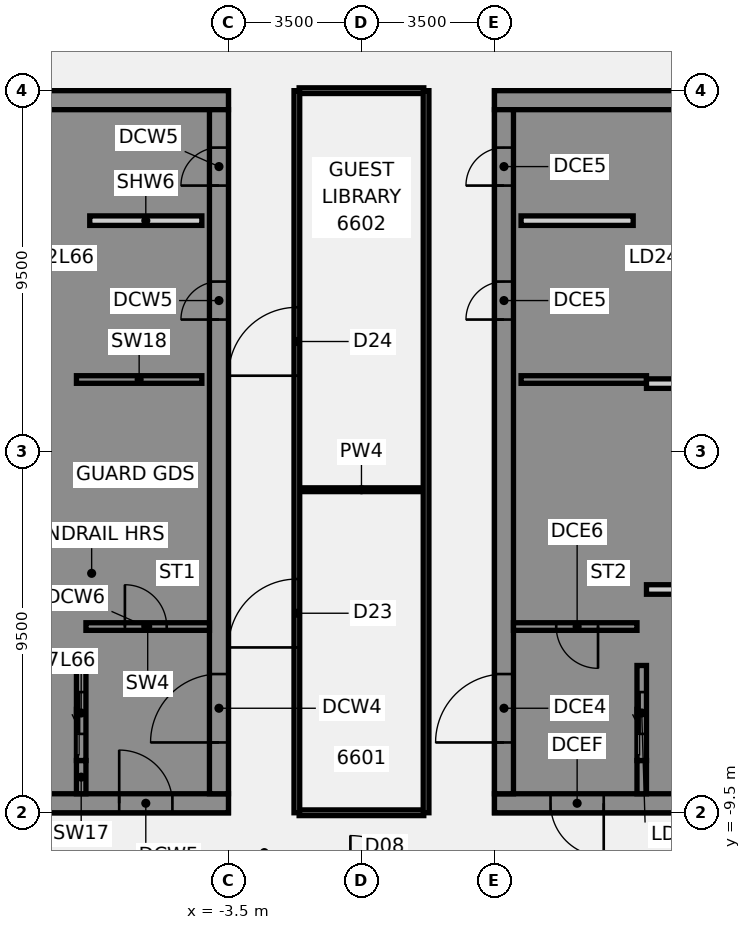
"""IFC4 building model, lengths in metres.
Left out: names, types, materials, properties, quantities, classifications, styles, units other than length and angle.
Written with IfcOpenShell. Run it as: python <this file> out.ifc"""

import sys

from ifc_helpers import new_model, si_unit, direction, frame, frame_2d, origin, place, context, subcontext, project, spatial, polyline, rectangle, outline, extrude, element, fill, save


model = new_model("IFC4")
c1 = context("Model", 3, precision=1e-05, world=origin(), true_north=direction((0.0, 1.0)))
c2 = subcontext(c1, "Body", "Model", "MODEL_VIEW")
j1 = project(units=[si_unit("LENGTHUNIT", "METRE"), si_unit("PLANEANGLEUNIT", "RADIAN")], contexts=[c1])
p1 = place(None, origin())
s1 = spatial("IfcSite", under=j1, at=p1, CompositionType="ELEMENT")
p2 = place(p1, origin())
s2 = spatial("IfcBuilding", under=s1, at=p2, CompositionType="ELEMENT")
p3 = place(p2, frame((0.0, 0.0, 260.4)))
s3 = spatial("IfcBuildingStorey", under=s2, at=p3, CompositionType="ELEMENT", Elevation=260.4)
p4 = place(p3, frame((-1.64, -9.5, 0.0), z_axis=(0.0, 0.0, 1.0), x_axis=(1.0, 0.0, 0.0)))
e1 = element("IfcWall", 1, at=p4, inside=s3, PredefinedType="PARTITIONING", context=c2, shape_type="SweptSolid", body=[
    extrude(rectangle(XDim=3.28, YDim=0.15, at=frame_2d((1.64, 0.0))), origin(), (0.0, 0.0, 1.0), 2.864),
])
p5 = place(p3, frame((-1.64, -1.0, 0.0), z_axis=(0.0, 0.0, 1.0), x_axis=(1.0, 0.0, 0.0)))
e2 = element("IfcWall", 2, at=p5, inside=s3, PredefinedType="PARTITIONING", context=c2, shape_type="SweptSolid", body=[
    extrude(rectangle(XDim=3.28, YDim=0.1, at=frame_2d((1.64, 0.0))), origin(), (0.0, 0.0, 1.0), 2.864),
])
p6 = place(p3, frame((-1.64, 9.5, 0.0), z_axis=(0.0, 0.0, 1.0), x_axis=(1.0, 0.0, 0.0)))
e3 = element("IfcWall", 3, at=p6, inside=s3, PredefinedType="PARTITIONING", context=c2, shape_type="SweptSolid", body=[
    extrude(rectangle(XDim=3.28, YDim=0.15, at=frame_2d((1.64, 0.0))), origin(), (0.0, 0.0, 1.0), 2.864),
])
p7 = place(p3, frame((-1.7, -9.5, 0.0), z_axis=(0.0, 0.0, 1.0), x_axis=(0.0, 1.0, 0.0)))
e4 = element("IfcWall", 4, at=p7, inside=s3, PredefinedType="PARTITIONING", context=c2, shape_type="SweptSolid", body=[
    extrude(rectangle(XDim=19.0, YDim=0.15, at=frame_2d((9.5, 0.0))), origin(), (0.0, 0.0, 1.0), 2.864),
])
p8 = place(p7, frame((4.35, 0.0, 0.0)))
e5 = element("IfcOpeningElement", 5, at=p8, cuts=e4, PredefinedType="OPENING", context=c2, shape_type="SweptSolid", body=[
    extrude(rectangle(XDim=1.8, YDim=2.1, at=frame_2d((0.9, 1.05))), frame((0.0, 0.085, 0.0), z_axis=(0.0, -1.0, 0.0), x_axis=(1.0, 0.0, 0.0)), (0.0, 0.0, 1.0), 0.17),
])
p9 = place(p7, frame((11.5, 0.0, 0.0)))
e6 = element("IfcOpeningElement", 6, at=p9, cuts=e4, PredefinedType="OPENING", context=c2, shape_type="SweptSolid", body=[
    extrude(rectangle(XDim=1.8, YDim=2.1, at=frame_2d((0.9, 1.05))), frame((0.0, 0.085, 0.0), z_axis=(0.0, -1.0, 0.0), x_axis=(1.0, 0.0, 0.0)), (0.0, 0.0, 1.0), 0.17),
])
p10 = place(p3, frame((1.7, -9.5, 0.0), z_axis=(0.0, 0.0, 1.0), x_axis=(0.0, 1.0, 0.0)))
e7 = element("IfcWall", 7, at=p10, inside=s3, PredefinedType="PARTITIONING", context=c2, shape_type="SweptSolid", body=[
    extrude(rectangle(XDim=19.0, YDim=0.15, at=frame_2d((9.5, 0.0))), origin(), (0.0, 0.0, 1.0), 2.864),
])
p11 = place(p3, frame((-16.5, -9.25, 0.0), z_axis=(0.0, 0.0, 1.0), x_axis=(1.0, 0.0, 0.0)))
e8 = element("IfcWall", 8, at=p11, inside=s3, PredefinedType="SHEAR", context=c2, shape_type="SweptSolid", body=[
    extrude(rectangle(XDim=13.0, YDim=0.5, at=frame_2d((6.5, 0.0))), origin(), (0.0, 0.0, 1.0), 3.46),
])
p12 = place(p11, frame((4.15, 0.0, 0.0)))
e9 = element("IfcOpeningElement", 9, at=p12, cuts=e8, PredefinedType="OPENING", context=c2, shape_type="SweptSolid", body=[
    extrude(rectangle(XDim=1.4, YDim=2.1, at=frame_2d((0.7, 1.05))), frame((0.0, 0.26, 0.0), z_axis=(0.0, -1.0, 0.0), x_axis=(1.0, 0.0, 0.0)), (0.0, 0.0, 1.0), 0.52),
])
p13 = place(p11, frame((10.125, 0.0, 0.0)))
e10 = element("IfcOpeningElement", 10, at=p13, cuts=e8, PredefinedType="OPENING", context=c2, shape_type="SweptSolid", body=[
    extrude(rectangle(XDim=1.4, YDim=2.1, at=frame_2d((0.7, 1.05))), frame((0.0, 0.26, 0.0), z_axis=(0.0, -1.0, 0.0), x_axis=(1.0, 0.0, 0.0)), (0.0, 0.0, 1.0), 0.52),
])
p14 = place(p3, frame((-16.5, 9.25, 0.0), z_axis=(0.0, 0.0, 1.0), x_axis=(1.0, 0.0, 0.0)))
e11 = element("IfcWall", 11, at=p14, inside=s3, PredefinedType="SHEAR", context=c2, shape_type="SweptSolid", body=[
    extrude(rectangle(XDim=13.0, YDim=0.5, at=frame_2d((6.5, 0.0))), origin(), (0.0, 0.0, 1.0), 3.46),
])
p15 = place(p3, origin())
e12 = element("IfcWall", 12, at=p15, inside=s3, PredefinedType="SHEAR", context=c2, shape_type="SweptSolid", body=[
    extrude(outline(polyline([(-9.8, -5.375), (-9.8, -5.625), (-7.5, -5.625), (-7.25, -5.625), (-7.25, 9.0), (-7.5, 9.0), (-9.8, 9.0), (-9.8, 8.125), (-7.5, 8.125), (-7.5, 5.625), (-9.8, 5.625), (-9.8, 5.375), (-7.5, 5.375), (-7.5, 2.875), (-9.8, 2.875), (-9.8, 2.625), (-7.5, 2.625), (-7.5, -5.375), (-9.8, -5.375)])), origin(), (0.0, 0.0, 1.0), 3.46),
])
p16 = place(p3, origin())
e13 = element("IfcWall", 13, at=p16, inside=s3, PredefinedType="SHEAR", context=c2, shape_type="SweptSolid", body=[
    extrude(outline(polyline([(-7.5, -8.125), (-9.55, -8.125), (-9.55, -5.625), (-9.8, -5.625), (-9.8, -8.125), (-9.8, -9.0), (-7.5, -9.0), (-7.5, -8.125)])), origin(), (0.0, 0.0, 1.0), 3.46),
])
p17 = place(p3, frame((-7.375, -9.0, 0.0), z_axis=(0.0, 0.0, 1.0), x_axis=(0.0, 1.0, 0.0)))
e14 = element("IfcWall", 14, at=p17, inside=s3, PredefinedType="SHEAR", context=c2, shape_type="SweptSolid", body=[
    extrude(rectangle(XDim=0.875, YDim=0.25, at=frame_2d((0.438, 0.0))), origin(), (0.0, 0.0, 1.0), 3.46),
])
p18 = place(p3, frame((-7.5, 1.9, 0.0), z_axis=(0.0, 0.0, 1.0), x_axis=(1.0, 0.0, 0.0)))
e15 = element("IfcWall", 15, at=p18, inside=s3, PredefinedType="SHEAR", context=c2, shape_type="SweptSolid", body=[
    extrude(rectangle(XDim=3.3, YDim=0.2, at=frame_2d((1.65, 0.0))), origin(), (0.0, 0.0, 1.0), 3.46),
])
p19 = place(p3, frame((-7.375, -8.125, 0.0), z_axis=(0.0, 0.0, 1.0), x_axis=(0.0, 1.0, 0.0)))
e16 = element("IfcWall", 16, at=p19, inside=s3, PredefinedType="SHEAR", context=c2, shape_type="SweptSolid", body=[
    extrude(rectangle(XDim=2.5, YDim=0.25, at=frame_2d((1.25, 0.0))), origin(), (0.0, 0.0, 1.0), 3.46),
])
p20 = place(p19, frame((0.7, 0.0, 0.0)))
e17 = element("IfcOpeningElement", 17, at=p20, cuts=e16, PredefinedType="OPENING", context=c2, shape_type="SweptSolid", body=[
    extrude(rectangle(XDim=1.1, YDim=2.1, at=frame_2d((0.55, 1.05))), frame((0.0, 0.135, 0.0), z_axis=(0.0, -1.0, 0.0), x_axis=(1.0, 0.0, 0.0)), (0.0, 0.0, 1.0), 0.27),
])
p21 = place(p3, frame((-3.75, -9.0, 0.0), z_axis=(0.0, 0.0, 1.0), x_axis=(0.0, 1.0, 0.0)))
e18 = element("IfcWall", 18, at=p21, inside=s3, PredefinedType="SHEAR", context=c2, shape_type="SweptSolid", body=[
    extrude(rectangle(XDim=18.0, YDim=0.5, at=frame_2d((9.0, 0.0))), origin(), (0.0, 0.0, 1.0), 3.46),
])
p22 = place(p21, frame((1.35, 0.0, 0.0)))
e19 = element("IfcOpeningElement", 19, at=p22, cuts=e18, PredefinedType="OPENING", context=c2, shape_type="SweptSolid", body=[
    extrude(rectangle(XDim=1.8, YDim=2.1, at=frame_2d((0.9, 1.05))), frame((0.0, 0.26, 0.0), z_axis=(0.0, -1.0, 0.0), x_axis=(1.0, 0.0, 0.0)), (0.0, 0.0, 1.0), 0.52),
])
p23 = place(p21, frame((12.478, 0.0, 0.0)))
e20 = element("IfcOpeningElement", 20, at=p23, cuts=e18, PredefinedType="OPENING", context=c2, shape_type="SweptSolid", body=[
    extrude(rectangle(XDim=1.0, YDim=2.1, at=frame_2d((0.5, 1.05))), frame((0.0, 0.26, 0.0), z_axis=(0.0, -1.0, 0.0), x_axis=(1.0, 0.0, 0.0)), (0.0, 0.0, 1.0), 0.52),
])
p24 = place(p21, frame((16.002, 0.0, 0.0)))
e21 = element("IfcOpeningElement", 21, at=p24, cuts=e18, PredefinedType="OPENING", context=c2, shape_type="SweptSolid", body=[
    extrude(rectangle(XDim=1.0, YDim=2.1, at=frame_2d((0.5, 1.05))), frame((0.0, 0.26, 0.0), z_axis=(0.0, -1.0, 0.0), x_axis=(1.0, 0.0, 0.0)), (0.0, 0.0, 1.0), 0.52),
])
p25 = place(p3, frame((-7.15, 6.08, 0.0), z_axis=(0.0, 0.0, 1.0), x_axis=(1.0, 0.0, 0.0)))
e22 = element("IfcWall", 22, at=p25, inside=s3, PredefinedType="PARTITIONING", context=c2, shape_type="SweptSolid", body=[
    extrude(rectangle(XDim=2.95, YDim=0.25, at=frame_2d((1.475, 0.0))), origin(), (0.0, 0.0, 1.0), 3.46),
])
p26 = place(p3, frame((-7.25, -4.6, 0.0), z_axis=(0.0, 0.0, 1.0), x_axis=(1.0, 0.0, 0.0)))
e23 = element("IfcWall", 23, at=p26, inside=s3, PredefinedType="SHEAR", context=c2, shape_type="SweptSolid", body=[
    extrude(rectangle(XDim=3.25, YDim=0.2, at=frame_2d((1.625, 0.0))), origin(), (0.0, 0.0, 1.0), 3.46),
])
p27 = place(p26, frame((1.025, 0.0, 0.0)))
e24 = element("IfcOpeningElement", 24, at=p27, cuts=e23, PredefinedType="OPENING", context=c2, shape_type="SweptSolid", body=[
    extrude(rectangle(XDim=1.1, YDim=2.1, at=frame_2d((0.55, 1.05))), frame((0.0, 0.11, 0.0), z_axis=(0.0, -1.0, 0.0), x_axis=(1.0, 0.0, 0.0)), (0.0, 0.0, 1.0), 0.22),
])
p28 = place(p3, frame((16.5, -9.25, 0.0), z_axis=(0.0, 0.0, 1.0), x_axis=(-1.0, 0.0, 0.0)))
e25 = element("IfcWall", 25, at=p28, inside=s3, PredefinedType="SHEAR", context=c2, shape_type="SweptSolid", body=[
    extrude(rectangle(XDim=13.0, YDim=0.5, at=frame_2d((6.5, 0.0))), origin(), (0.0, 0.0, 1.0), 3.46),
])
p29 = place(p28, frame((4.15, 0.0, 0.0)))
e26 = element("IfcOpeningElement", 26, at=p29, cuts=e25, PredefinedType="OPENING", context=c2, shape_type="SweptSolid", body=[
    extrude(rectangle(XDim=1.4, YDim=2.1, at=frame_2d((0.7, 1.05))), frame((0.0, 0.26, 0.0), z_axis=(0.0, -1.0, 0.0), x_axis=(1.0, 0.0, 0.0)), (0.0, 0.0, 1.0), 0.52),
])
p30 = place(p28, frame((10.125, 0.0, 0.0)))
e27 = element("IfcOpeningElement", 27, at=p30, cuts=e25, PredefinedType="OPENING", context=c2, shape_type="SweptSolid", body=[
    extrude(rectangle(XDim=1.4, YDim=2.1, at=frame_2d((0.7, 1.05))), frame((0.0, 0.26, 0.0), z_axis=(0.0, -1.0, 0.0), x_axis=(1.0, 0.0, 0.0)), (0.0, 0.0, 1.0), 0.52),
])
p31 = place(p3, frame((16.5, 9.25, 0.0), z_axis=(0.0, 0.0, 1.0), x_axis=(-1.0, 0.0, 0.0)))
e28 = element("IfcWall", 28, at=p31, inside=s3, PredefinedType="SHEAR", context=c2, shape_type="SweptSolid", body=[
    extrude(rectangle(XDim=13.0, YDim=0.5, at=frame_2d((6.5, 0.0))), origin(), (0.0, 0.0, 1.0), 3.46),
])
p32 = place(p3, origin())
e29 = element("IfcWall", 29, at=p32, inside=s3, PredefinedType="SHEAR", context=c2, shape_type="SweptSolid", body=[
    extrude(outline(polyline([(9.8, -5.375), (7.5, -5.375), (7.5, 2.625), (9.8, 2.625), (9.8, 2.875), (7.5, 2.875), (7.5, 5.375), (9.8, 5.375), (9.8, 5.625), (7.5, 5.625), (7.5, 8.125), (9.8, 8.125), (9.8, 9.0), (7.5, 9.0), (7.25, 9.0), (7.25, -5.625), (7.5, -5.625), (9.8, -5.625), (9.8, -5.375)])), origin(), (0.0, 0.0, 1.0), 3.46),
])
p33 = place(p3, origin())
e30 = element("IfcWall", 30, at=p33, inside=s3, PredefinedType="SHEAR", context=c2, shape_type="SweptSolid", body=[
    extrude(outline(polyline([(7.5, -8.125), (7.5, -9.0), (9.8, -9.0), (9.8, -8.125), (9.8, -5.625), (9.55, -5.625), (9.55, -8.125), (7.5, -8.125)])), origin(), (0.0, 0.0, 1.0), 3.46),
])
p34 = place(p3, frame((7.375, -9.0, 0.0), z_axis=(0.0, 0.0, 1.0), x_axis=(0.0, 1.0, 0.0)))
e31 = element("IfcWall", 31, at=p34, inside=s3, PredefinedType="SHEAR", context=c2, shape_type="SweptSolid", body=[
    extrude(rectangle(XDim=0.875, YDim=0.25, at=frame_2d((0.438, 0.0))), origin(), (0.0, 0.0, 1.0), 3.46),
])
p35 = place(p3, frame((7.5, 1.9, 0.0), z_axis=(0.0, 0.0, 1.0), x_axis=(-1.0, 0.0, 0.0)))
e32 = element("IfcWall", 32, at=p35, inside=s3, PredefinedType="SHEAR", context=c2, shape_type="SweptSolid", body=[
    extrude(rectangle(XDim=3.3, YDim=0.2, at=frame_2d((1.65, 0.0))), origin(), (0.0, 0.0, 1.0), 3.46),
])
p36 = place(p3, frame((7.375, -8.125, 0.0), z_axis=(0.0, 0.0, 1.0), x_axis=(0.0, 1.0, 0.0)))
e33 = element("IfcWall", 33, at=p36, inside=s3, PredefinedType="SHEAR", context=c2, shape_type="SweptSolid", body=[
    extrude(rectangle(XDim=2.5, YDim=0.25, at=frame_2d((1.25, 0.0))), origin(), (0.0, 0.0, 1.0), 3.46),
])
p37 = place(p36, frame((0.7, 0.0, 0.0)))
e34 = element("IfcOpeningElement", 34, at=p37, cuts=e33, PredefinedType="OPENING", context=c2, shape_type="SweptSolid", body=[
    extrude(rectangle(XDim=1.1, YDim=2.1, at=frame_2d((0.55, 1.05))), frame((0.0, 0.135, 0.0), z_axis=(0.0, -1.0, 0.0), x_axis=(1.0, 0.0, 0.0)), (0.0, 0.0, 1.0), 0.27),
])
p38 = place(p3, frame((3.75, -9.0, 0.0), z_axis=(0.0, 0.0, 1.0), x_axis=(0.0, 1.0, 0.0)))
e35 = element("IfcWall", 35, at=p38, inside=s3, PredefinedType="SHEAR", context=c2, shape_type="SweptSolid", body=[
    extrude(rectangle(XDim=18.0, YDim=0.5, at=frame_2d((9.0, 0.0))), origin(), (0.0, 0.0, 1.0), 3.46),
])
p39 = place(p38, frame((1.35, 0.0, 0.0)))
e36 = element("IfcOpeningElement", 36, at=p39, cuts=e35, PredefinedType="OPENING", context=c2, shape_type="SweptSolid", body=[
    extrude(rectangle(XDim=1.8, YDim=2.1, at=frame_2d((0.9, 1.05))), frame((0.0, 0.26, 0.0), z_axis=(0.0, -1.0, 0.0), x_axis=(1.0, 0.0, 0.0)), (0.0, 0.0, 1.0), 0.52),
])
p40 = place(p38, frame((12.478, 0.0, 0.0)))
e37 = element("IfcOpeningElement", 37, at=p40, cuts=e35, PredefinedType="OPENING", context=c2, shape_type="SweptSolid", body=[
    extrude(rectangle(XDim=1.0, YDim=2.1, at=frame_2d((0.5, 1.05))), frame((0.0, 0.26, 0.0), z_axis=(0.0, -1.0, 0.0), x_axis=(1.0, 0.0, 0.0)), (0.0, 0.0, 1.0), 0.52),
])
p41 = place(p38, frame((16.002, 0.0, 0.0)))
e38 = element("IfcOpeningElement", 38, at=p41, cuts=e35, PredefinedType="OPENING", context=c2, shape_type="SweptSolid", body=[
    extrude(rectangle(XDim=1.0, YDim=2.1, at=frame_2d((0.5, 1.05))), frame((0.0, 0.26, 0.0), z_axis=(0.0, -1.0, 0.0), x_axis=(1.0, 0.0, 0.0)), (0.0, 0.0, 1.0), 0.52),
])
p42 = place(p3, frame((7.15, 6.08, 0.0), z_axis=(0.0, 0.0, 1.0), x_axis=(-1.0, 0.0, 0.0)))
e39 = element("IfcWall", 39, at=p42, inside=s3, PredefinedType="PARTITIONING", context=c2, shape_type="SweptSolid", body=[
    extrude(rectangle(XDim=2.95, YDim=0.25, at=frame_2d((1.475, 0.0))), origin(), (0.0, 0.0, 1.0), 3.46),
])
p43 = place(p3, frame((7.25, -4.6, 0.0), z_axis=(0.0, 0.0, 1.0), x_axis=(-1.0, 0.0, 0.0)))
e40 = element("IfcWall", 40, at=p43, inside=s3, PredefinedType="SHEAR", context=c2, shape_type="SweptSolid", body=[
    extrude(rectangle(XDim=3.25, YDim=0.2, at=frame_2d((1.625, 0.0))), origin(), (0.0, 0.0, 1.0), 3.46),
])
p44 = place(p43, frame((1.025, 0.0, 0.0)))
e41 = element("IfcOpeningElement", 41, at=p44, cuts=e40, PredefinedType="OPENING", context=c2, shape_type="SweptSolid", body=[
    extrude(rectangle(XDim=1.1, YDim=2.1, at=frame_2d((0.55, 1.05))), frame((0.0, 0.11, 0.0), z_axis=(0.0, -1.0, 0.0), x_axis=(1.0, 0.0, 0.0)), (0.0, 0.0, 1.0), 0.22),
])
for number, where, z_axis, x_axis in (
    (42, (9.8, -3.625, 0.0), (0.0, 0.0, 1.0), (-1.0, 0.0, 0.0)),
    (43, (9.8, 1.792, 0.0), (0.0, 0.0, 1.0), (-1.0, 0.0, 0.0)),
):
    element("IfcWall", number, at=place(p3, frame(where, z_axis=z_axis, x_axis=x_axis)), inside=s3, PredefinedType="PARTITIONING", context=c2, shape_type="SweptSolid", body=[
        extrude(rectangle(XDim=2.3, YDim=0.25, at=frame_2d((1.15, 0.0))), origin(), (0.0, 0.0, 1.0), 3.46),
    ])
p45 = place(p8, frame((1.8, 0.0, 0.0), z_axis=(0.0, 0.0, 1.0), x_axis=(-1.0, 0.0, 0.0)))
e44 = element("IfcDoor", 44, at=p45, inside=s3, OperationType="DOUBLE_DOOR_SINGLE_SWING", PredefinedType="DOOR", context=c2, shape_type="SweptSolid", body=[
    extrude(rectangle(XDim=1.8, YDim=2.1, at=frame_2d((0.9, 1.05))), frame((0.0, 0.025, 0.0), z_axis=(0.0, -1.0, 0.0), x_axis=(1.0, 0.0, 0.0)), (0.0, 0.0, 1.0), 0.05),
])
fill(e5, e44)
p46 = place(p9, frame((1.8, 0.0, 0.0), z_axis=(0.0, 0.0, 1.0), x_axis=(-1.0, 0.0, 0.0)))
e45 = element("IfcDoor", 45, at=p46, inside=s3, OperationType="DOUBLE_DOOR_SINGLE_SWING", PredefinedType="DOOR", context=c2, shape_type="SweptSolid", body=[
    extrude(rectangle(XDim=1.8, YDim=2.1, at=frame_2d((0.9, 1.05))), frame((0.0, 0.025, 0.0), z_axis=(0.0, -1.0, 0.0), x_axis=(1.0, 0.0, 0.0)), (0.0, 0.0, 1.0), 0.05),
])
fill(e6, e45)
p47 = place(p13, origin())
e46 = element("IfcDoor", 46, at=p47, inside=s3, OperationType="SINGLE_SWING_LEFT", PredefinedType="DOOR", context=c2, shape_type="SweptSolid", body=[
    extrude(rectangle(XDim=1.4, YDim=2.1, at=frame_2d((0.7, 1.05))), frame((0.0, 0.025, 0.0), z_axis=(0.0, -1.0, 0.0), x_axis=(1.0, 0.0, 0.0)), (0.0, 0.0, 1.0), 0.05),
])
fill(e10, e46)
p48 = place(p22, origin())
e47 = element("IfcDoor", 47, at=p48, inside=s3, OperationType="SINGLE_SWING_LEFT", PredefinedType="DOOR", context=c2, shape_type="SweptSolid", body=[
    extrude(rectangle(XDim=1.8, YDim=2.1, at=frame_2d((0.9, 1.05))), frame((0.0, 0.025, 0.0), z_axis=(0.0, -1.0, 0.0), x_axis=(1.0, 0.0, 0.0)), (0.0, 0.0, 1.0), 0.05),
])
fill(e19, e47)
p49 = place(p23, origin())
e48 = element("IfcDoor", 48, at=p49, inside=s3, OperationType="SINGLE_SWING_LEFT", PredefinedType="DOOR", context=c2, shape_type="SweptSolid", body=[
    extrude(rectangle(XDim=1.0, YDim=2.1, at=frame_2d((0.5, 1.05))), frame((0.0, 0.225, 0.0), z_axis=(0.0, -1.0, 0.0), x_axis=(1.0, 0.0, 0.0)), (0.0, 0.0, 1.0), 0.05),
])
fill(e20, e48)
p50 = place(p24, origin())
e49 = element("IfcDoor", 49, at=p50, inside=s3, OperationType="SINGLE_SWING_LEFT", PredefinedType="DOOR", context=c2, shape_type="SweptSolid", body=[
    extrude(rectangle(XDim=1.0, YDim=2.1, at=frame_2d((0.5, 1.05))), frame((0.0, 0.225, 0.0), z_axis=(0.0, -1.0, 0.0), x_axis=(1.0, 0.0, 0.0)), (0.0, 0.0, 1.0), 0.05),
])
fill(e21, e49)
p51 = place(p27, origin())
e50 = element("IfcDoor", 50, at=p51, inside=s3, OperationType="SINGLE_SWING_LEFT", PredefinedType="DOOR", context=c2, shape_type="SweptSolid", body=[
    extrude(rectangle(XDim=1.1, YDim=2.1, at=frame_2d((0.55, 1.05))), frame((0.0, 0.025, 0.0), z_axis=(0.0, -1.0, 0.0), x_axis=(1.0, 0.0, 0.0)), (0.0, 0.0, 1.0), 0.05),
])
fill(e24, e50)
p52 = place(p20, origin())
e51 = element("IfcDoor", 51, at=p52, inside=s3, OperationType="SLIDING_TO_LEFT", PredefinedType="DOOR", context=c2, shape_type="SweptSolid", body=[
    extrude(rectangle(XDim=1.1, YDim=2.1, at=frame_2d((0.55, 1.05))), frame((0.0, 0.025, 0.0), z_axis=(0.0, -1.0, 0.0), x_axis=(1.0, 0.0, 0.0)), (0.0, 0.0, 1.0), 0.05),
])
fill(e17, e51)
p53 = place(p30, origin())
e52 = element("IfcDoor", 52, at=p53, inside=s3, OperationType="SINGLE_SWING_LEFT", PredefinedType="DOOR", context=c2, shape_type="SweptSolid", body=[
    extrude(rectangle(XDim=1.4, YDim=2.1, at=frame_2d((0.7, 1.05))), frame((0.0, 0.025, 0.0), z_axis=(0.0, -1.0, 0.0), x_axis=(1.0, 0.0, 0.0)), (0.0, 0.0, 1.0), 0.05),
])
fill(e27, e52)
p54 = place(p39, origin())
e53 = element("IfcDoor", 53, at=p54, inside=s3, OperationType="SINGLE_SWING_LEFT", PredefinedType="DOOR", context=c2, shape_type="SweptSolid", body=[
    extrude(rectangle(XDim=1.8, YDim=2.1, at=frame_2d((0.9, 1.05))), frame((0.0, 0.025, 0.0), z_axis=(0.0, -1.0, 0.0), x_axis=(1.0, 0.0, 0.0)), (0.0, 0.0, 1.0), 0.05),
])
fill(e36, e53)
p55 = place(p40, origin())
e54 = element("IfcDoor", 54, at=p55, inside=s3, OperationType="SINGLE_SWING_LEFT", PredefinedType="DOOR", context=c2, shape_type="SweptSolid", body=[
    extrude(rectangle(XDim=1.0, YDim=2.1, at=frame_2d((0.5, 1.05))), frame((0.0, -0.175, 0.0), z_axis=(0.0, -1.0, 0.0), x_axis=(1.0, 0.0, 0.0)), (0.0, 0.0, 1.0), 0.05),
])
fill(e37, e54)
p56 = place(p41, origin())
e55 = element("IfcDoor", 55, at=p56, inside=s3, OperationType="SINGLE_SWING_LEFT", PredefinedType="DOOR", context=c2, shape_type="SweptSolid", body=[
    extrude(rectangle(XDim=1.0, YDim=2.1, at=frame_2d((0.5, 1.05))), frame((0.0, -0.175, 0.0), z_axis=(0.0, -1.0, 0.0), x_axis=(1.0, 0.0, 0.0)), (0.0, 0.0, 1.0), 0.05),
])
fill(e38, e55)
p57 = place(p44, origin())
e56 = element("IfcDoor", 56, at=p57, inside=s3, OperationType="SINGLE_SWING_LEFT", PredefinedType="DOOR", context=c2, shape_type="SweptSolid", body=[
    extrude(rectangle(XDim=1.1, YDim=2.1, at=frame_2d((0.55, 1.05))), frame((0.0, 0.025, 0.0), z_axis=(0.0, -1.0, 0.0), x_axis=(1.0, 0.0, 0.0)), (0.0, 0.0, 1.0), 0.05),
])
fill(e41, e56)
p58 = place(p37, origin())
e57 = element("IfcDoor", 57, at=p58, inside=s3, OperationType="SLIDING_TO_LEFT", PredefinedType="DOOR", context=c2, shape_type="SweptSolid", body=[
    extrude(rectangle(XDim=1.1, YDim=2.1, at=frame_2d((0.55, 1.05))), frame((0.0, 0.025, 0.0), z_axis=(0.0, -1.0, 0.0), x_axis=(1.0, 0.0, 0.0)), (0.0, 0.0, 1.0), 0.05),
])
fill(e34, e57)
save(model, sys.argv[1])
